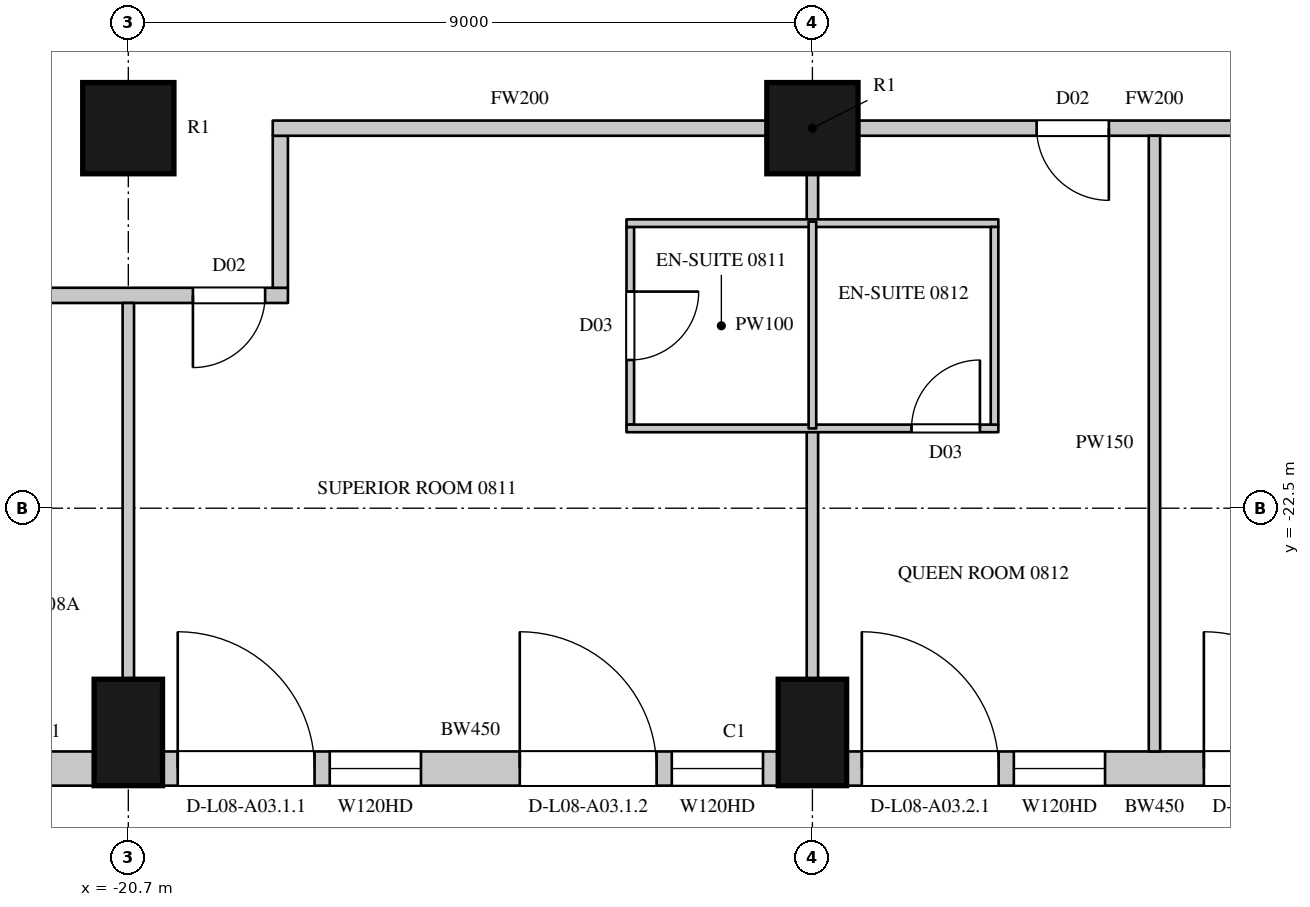
"""IFC4 building model, lengths in metres.
Left out: names, types, materials, properties, quantities, classifications, styles, units other than length and angle.
Written with IfcOpenShell. Run it as: python <this file> out.ifc"""

import sys

from ifc_helpers import new_model, si_unit, direction, frame, frame_2d, origin, origin_2d, place, context, subcontext, project, spatial, rectangle, circle, extrude, element, fill, save


model = new_model("IFC4")
c1 = context("Model", 3, precision=1e-05, world=origin(), true_north=direction((0.0, 1.0)))
c2 = subcontext(c1, "Body", "Model", "MODEL_VIEW")
j1 = project(units=[si_unit("LENGTHUNIT", "METRE"), si_unit("PLANEANGLEUNIT", "RADIAN")], contexts=[c1])
p1 = place(None, origin())
s1 = spatial("IfcSite", under=j1, at=p1, CompositionType="ELEMENT")
p2 = place(p1, origin())
s2 = spatial("IfcBuilding", under=s1, at=p2, CompositionType="ELEMENT")
p3 = place(p2, frame((0.0, 0.0, 59.1)))
s3 = spatial("IfcBuildingStorey", under=s2, at=p3, CompositionType="ELEMENT", Elevation=59.1)
for number, where, z_axis, x_axis in (
    (1, (-20.7, -25.45, 0.0), (0.0, 0.0, 1.0), (1.0, 0.0, 0.0)),
    (2, (-11.7, -25.45, 0.0), (0.0, 0.0, 1.0), (1.0, 0.0, 0.0)),
):
    element("IfcColumn", number, at=place(p3, frame(where, z_axis=z_axis, x_axis=x_axis)), inside=s3, PredefinedType="COLUMN", context=c2, shape_type="SweptSolid", body=[
        extrude(rectangle(XDim=0.9, YDim=1.4, at=origin_2d()), origin(), (0.0, 0.0, 1.0), 3.6),
    ])
for number, where, z_axis, x_axis in (
    (3, (-20.7, -17.5, 0.0), (0.0, 0.0, 1.0), (1.0, 0.0, 0.0)),
    (4, (-11.7, -17.5, 0.0), (0.0, 0.0, 1.0), (1.0, 0.0, 0.0)),
):
    element("IfcColumn", number, at=place(p3, frame(where, z_axis=z_axis, x_axis=x_axis)), inside=s3, PredefinedType="COLUMN", context=c2, shape_type="SweptSolid", body=[
        extrude(circle(Radius=0.6, at=origin_2d()), origin(), (0.0, 0.0, 1.0), 3.6),
    ])
p4 = place(p3, frame((-24.064, -25.925, 0.0), z_axis=(0.0, 0.0, 1.0), x_axis=(1.0, 0.0, 0.0)))
e5 = element("IfcWall", 5, at=p4, inside=s3, PredefinedType="SOLIDWALL", context=c2, shape_type="SweptSolid", body=[
    extrude(rectangle(XDim=2.914, YDim=0.45, at=frame_2d((1.457, 0.0))), origin(), (0.0, 0.0, 1.0), 3.3),
])
p5 = place(p3, frame((-20.25, -25.925, 0.0), z_axis=(0.0, 0.0, 1.0), x_axis=(1.0, 0.0, 0.0)))
e6 = element("IfcWall", 6, at=p5, inside=s3, PredefinedType="SOLIDWALL", context=c2, shape_type="SweptSolid", body=[
    extrude(rectangle(XDim=8.1, YDim=0.45, at=frame_2d((4.05, 0.0))), origin(), (0.0, 0.0, 1.0), 3.3),
])
p6 = place(p5, frame((0.2, 0.0, 0.0)))
e7 = element("IfcOpeningElement", 7, at=p6, cuts=e6, PredefinedType="OPENING", context=c2, shape_type="SweptSolid", body=[
    extrude(rectangle(XDim=1.8, YDim=2.4, at=frame_2d((0.9, 1.2))), frame((0.0, 0.235, 0.0), z_axis=(0.0, -1.0, 0.0), x_axis=(1.0, 0.0, 0.0)), (0.0, 0.0, 1.0), 0.47),
])
p7 = place(p5, frame((2.2, 0.0, 1.05)))
e8 = element("IfcOpeningElement", 8, at=p7, cuts=e6, PredefinedType="OPENING", context=c2, shape_type="SweptSolid", body=[
    extrude(rectangle(XDim=1.2, YDim=2.0, at=frame_2d((0.6, 1.0))), frame((0.0, 0.235, 0.0), z_axis=(0.0, -1.0, 0.0), x_axis=(1.0, 0.0, 0.0)), (0.0, 0.0, 1.0), 0.47),
])
p8 = place(p5, frame((4.7, 0.0, 0.0)))
e9 = element("IfcOpeningElement", 9, at=p8, cuts=e6, PredefinedType="OPENING", context=c2, shape_type="SweptSolid", body=[
    extrude(rectangle(XDim=1.8, YDim=2.4, at=frame_2d((0.9, 1.2))), frame((0.0, 0.235, 0.0), z_axis=(0.0, -1.0, 0.0), x_axis=(1.0, 0.0, 0.0)), (0.0, 0.0, 1.0), 0.47),
])
p9 = place(p5, frame((6.7, 0.0, 1.05)))
e10 = element("IfcOpeningElement", 10, at=p9, cuts=e6, PredefinedType="OPENING", context=c2, shape_type="SweptSolid", body=[
    extrude(rectangle(XDim=1.2, YDim=2.0, at=frame_2d((0.6, 1.0))), frame((0.0, 0.235, 0.0), z_axis=(0.0, -1.0, 0.0), x_axis=(1.0, 0.0, 0.0)), (0.0, 0.0, 1.0), 0.47),
])
p10 = place(p3, frame((-11.25, -25.925, 0.0), z_axis=(0.0, 0.0, 1.0), x_axis=(1.0, 0.0, 0.0)))
e11 = element("IfcWall", 11, at=p10, inside=s3, PredefinedType="SOLIDWALL", context=c2, shape_type="SweptSolid", body=[
    extrude(rectangle(XDim=8.1, YDim=0.45, at=frame_2d((4.05, 0.0))), origin(), (0.0, 0.0, 1.0), 3.3),
])
p11 = place(p10, frame((0.2, 0.0, 0.0)))
e12 = element("IfcOpeningElement", 12, at=p11, cuts=e11, PredefinedType="OPENING", context=c2, shape_type="SweptSolid", body=[
    extrude(rectangle(XDim=1.8, YDim=2.4, at=frame_2d((0.9, 1.2))), frame((0.0, 0.235, 0.0), z_axis=(0.0, -1.0, 0.0), x_axis=(1.0, 0.0, 0.0)), (0.0, 0.0, 1.0), 0.47),
])
p12 = place(p10, frame((2.2, 0.0, 1.05)))
e13 = element("IfcOpeningElement", 13, at=p12, cuts=e11, PredefinedType="OPENING", context=c2, shape_type="SweptSolid", body=[
    extrude(rectangle(XDim=1.2, YDim=2.0, at=frame_2d((0.6, 1.0))), frame((0.0, 0.235, 0.0), z_axis=(0.0, -1.0, 0.0), x_axis=(1.0, 0.0, 0.0)), (0.0, 0.0, 1.0), 0.47),
])
p13 = place(p10, frame((4.7, 0.0, 0.0)))
e14 = element("IfcOpeningElement", 14, at=p13, cuts=e11, PredefinedType="OPENING", context=c2, shape_type="SweptSolid", body=[
    extrude(rectangle(XDim=1.8, YDim=2.4, at=frame_2d((0.9, 1.2))), frame((0.0, 0.235, 0.0), z_axis=(0.0, -1.0, 0.0), x_axis=(1.0, 0.0, 0.0)), (0.0, 0.0, 1.0), 0.47),
])
p14 = place(p10, frame((6.7, 0.0, 1.05)))
e15 = element("IfcOpeningElement", 15, at=p14, cuts=e11, PredefinedType="OPENING", context=c2, shape_type="SweptSolid", body=[
    extrude(rectangle(XDim=1.2, YDim=2.0, at=frame_2d((0.6, 1.0))), frame((0.0, 0.235, 0.0), z_axis=(0.0, -1.0, 0.0), x_axis=(1.0, 0.0, 0.0)), (0.0, 0.0, 1.0), 0.47),
])
p15 = place(p3, frame((-23.7, -19.7, 0.0), z_axis=(0.0, 0.0, 1.0), x_axis=(1.0, 0.0, 0.0)))
e16 = element("IfcWall", 16, at=p15, inside=s3, PredefinedType="PARTITIONING", context=c2, shape_type="SweptSolid", body=[
    extrude(rectangle(XDim=5.1, YDim=0.2, at=frame_2d((2.55, 0.0))), origin(), (0.0, 0.0, 1.0), 3.3),
])
p16 = place(p15, frame((0.8, 0.0, 0.0)))
e17 = element("IfcOpeningElement", 17, at=p16, cuts=e16, PredefinedType="OPENING", context=c2, shape_type="SweptSolid", body=[
    extrude(rectangle(XDim=0.9, YDim=2.2, at=frame_2d((0.45, 1.1))), frame((0.0, 0.11, 0.0), z_axis=(0.0, -1.0, 0.0), x_axis=(1.0, 0.0, 0.0)), (0.0, 0.0, 1.0), 0.22),
])
p17 = place(p15, frame((3.85, 0.0, 0.0)))
e18 = element("IfcOpeningElement", 18, at=p17, cuts=e16, PredefinedType="OPENING", context=c2, shape_type="SweptSolid", body=[
    extrude(rectangle(XDim=0.95, YDim=2.2, at=frame_2d((0.475, 1.1))), frame((0.0, 0.11, 0.0), z_axis=(0.0, -1.0, 0.0), x_axis=(1.0, 0.0, 0.0)), (0.0, 0.0, 1.0), 0.22),
])
p18 = place(p3, frame((-18.7, -19.6, 0.0), z_axis=(0.0, 0.0, 1.0), x_axis=(0.0, 1.0, 0.0)))
e19 = element("IfcWall", 19, at=p18, inside=s3, PredefinedType="PARTITIONING", context=c2, shape_type="SweptSolid", body=[
    extrude(rectangle(XDim=2.0, YDim=0.2, at=frame_2d((1.0, 0.0))), origin(), (0.0, 0.0, 1.0), 3.3),
])
p19 = place(p3, frame((-18.8, -17.5, 0.0), z_axis=(0.0, 0.0, 1.0), x_axis=(1.0, 0.0, 0.0)))
e20 = element("IfcWall", 20, at=p19, inside=s3, PredefinedType="PARTITIONING", context=c2, shape_type="SweptSolid", body=[
    extrude(rectangle(XDim=6.5, YDim=0.2, at=frame_2d((3.25, 0.0))), origin(), (0.0, 0.0, 1.0), 2.75),
])
p20 = place(p3, frame((-11.1, -17.5, 0.0), z_axis=(0.0, 0.0, 1.0), x_axis=(1.0, 0.0, 0.0)))
e21 = element("IfcWall", 21, at=p20, inside=s3, PredefinedType="PARTITIONING", context=c2, shape_type="SweptSolid", body=[
    extrude(rectangle(XDim=7.8, YDim=0.2, at=frame_2d((3.9, 0.0))), origin(), (0.0, 0.0, 1.0), 2.75),
])
p21 = place(p20, frame((2.35, 0.0, 0.0)))
e22 = element("IfcOpeningElement", 22, at=p21, cuts=e21, PredefinedType="OPENING", context=c2, shape_type="SweptSolid", body=[
    extrude(rectangle(XDim=0.95, YDim=2.2, at=frame_2d((0.475, 1.1))), frame((0.0, 0.11, 0.0), z_axis=(0.0, -1.0, 0.0), x_axis=(1.0, 0.0, 0.0)), (0.0, 0.0, 1.0), 0.22),
])
p22 = place(p20, frame((5.2, 0.0, 0.0)))
e23 = element("IfcOpeningElement", 23, at=p22, cuts=e21, PredefinedType="OPENING", context=c2, shape_type="SweptSolid", body=[
    extrude(rectangle(XDim=0.95, YDim=2.2, at=frame_2d((0.475, 1.1))), frame((0.0, 0.11, 0.0), z_axis=(0.0, -1.0, 0.0), x_axis=(1.0, 0.0, 0.0)), (0.0, 0.0, 1.0), 0.22),
])
p23 = place(p3, frame((-20.7, -24.75, 0.0), z_axis=(0.0, 0.0, 1.0), x_axis=(0.0, 1.0, 0.0)))
e24 = element("IfcWall", 24, at=p23, inside=s3, PredefinedType="PARTITIONING", context=c2, shape_type="SweptSolid", body=[
    extrude(rectangle(XDim=4.95, YDim=0.15, at=frame_2d((2.475, 0.0))), origin(), (0.0, 0.0, 1.0), 2.75),
])
p24 = place(p3, frame((-11.7, -24.75, 0.0), z_axis=(0.0, 0.0, 1.0), x_axis=(0.0, 1.0, 0.0)))
e25 = element("IfcWall", 25, at=p24, inside=s3, PredefinedType="PARTITIONING", context=c2, shape_type="SweptSolid", body=[
    extrude(rectangle(XDim=3.3, YDim=0.15, at=frame_2d((1.65, 0.0))), origin(), (0.0, 0.0, 1.0), 2.75),
])
p25 = place(p3, frame((-11.7, -18.73, 0.0), z_axis=(0.0, 0.0, 1.0), x_axis=(0.0, 1.0, 0.0)))
e26 = element("IfcWall", 26, at=p25, inside=s3, PredefinedType="PARTITIONING", context=c2, shape_type="SweptSolid", body=[
    extrude(rectangle(XDim=0.63, YDim=0.15, at=frame_2d((0.315, 0.0))), origin(), (0.0, 0.0, 1.0), 2.75),
])
p26 = place(p3, frame((-7.2, -25.7, 0.0), z_axis=(0.0, 0.0, 1.0), x_axis=(0.0, 1.0, 0.0)))
e27 = element("IfcWall", 27, at=p26, inside=s3, PredefinedType="PARTITIONING", context=c2, shape_type="SweptSolid", body=[
    extrude(rectangle(XDim=8.1, YDim=0.15, at=frame_2d((4.05, 0.0))), origin(), (0.0, 0.0, 1.0), 2.65),
])
p27 = place(p3, frame((-14.096, -21.4, 0.0), z_axis=(0.0, 0.0, 1.0), x_axis=(0.0, 1.0, 0.0)))
e28 = element("IfcWall", 28, at=p27, inside=s3, PredefinedType="PARTITIONING", context=c2, shape_type="SweptSolid", body=[
    extrude(rectangle(XDim=2.6, YDim=0.1, at=frame_2d((1.3, 0.0))), origin(), (0.0, 0.0, 1.0), 3.3),
])
p28 = place(p27, frame((0.85, 0.0, 0.0)))
e29 = element("IfcOpeningElement", 29, at=p28, cuts=e28, PredefinedType="OPENING", context=c2, shape_type="SweptSolid", body=[
    extrude(rectangle(XDim=0.9, YDim=2.2, at=frame_2d((0.45, 1.1))), frame((0.0, 0.06, 0.0), z_axis=(0.0, -1.0, 0.0), x_axis=(1.0, 0.0, 0.0)), (0.0, 0.0, 1.0), 0.12),
])
p29 = place(p3, frame((-14.146, -21.45, 0.0), z_axis=(0.0, 0.0, 1.0), x_axis=(1.0, 0.0, 0.0)))
e30 = element("IfcWall", 30, at=p29, inside=s3, PredefinedType="PARTITIONING", context=c2, shape_type="SweptSolid", body=[
    extrude(rectangle(XDim=4.892, YDim=0.1, at=frame_2d((2.446, 0.0))), origin(), (0.0, 0.0, 1.0), 3.3),
])
p30 = place(p29, frame((3.75, 0.0, 0.0)))
e31 = element("IfcOpeningElement", 31, at=p30, cuts=e30, PredefinedType="OPENING", context=c2, shape_type="SweptSolid", body=[
    extrude(rectangle(XDim=0.9, YDim=2.2, at=frame_2d((0.45, 1.1))), frame((0.0, 0.06, 0.0), z_axis=(0.0, -1.0, 0.0), x_axis=(1.0, 0.0, 0.0)), (0.0, 0.0, 1.0), 0.12),
])
p31 = place(p3, frame((-14.146, -18.75, 0.0), z_axis=(0.0, 0.0, 1.0), x_axis=(1.0, 0.0, 0.0)))
e32 = element("IfcWall", 32, at=p31, inside=s3, PredefinedType="PARTITIONING", context=c2, shape_type="SweptSolid", body=[
    extrude(rectangle(XDim=4.892, YDim=0.1, at=frame_2d((2.446, 0.0))), origin(), (0.0, 0.0, 1.0), 3.3),
])
p32 = place(p3, frame((-11.7, -21.45, 0.0), z_axis=(0.0, 0.0, 1.0), x_axis=(0.0, 1.0, 0.0)))
e33 = element("IfcWall", 33, at=p32, inside=s3, PredefinedType="PARTITIONING", context=c2, shape_type="SweptSolid", body=[
    extrude(rectangle(XDim=2.72, YDim=0.1, at=frame_2d((1.36, 0.0))), origin(), (0.0, 0.0, 1.0), 2.75),
])
p33 = place(p3, frame((-9.304, -21.4, 0.0), z_axis=(0.0, 0.0, 1.0), x_axis=(0.0, 1.0, 0.0)))
e34 = element("IfcWall", 34, at=p33, inside=s3, PredefinedType="PARTITIONING", context=c2, shape_type="SweptSolid", body=[
    extrude(rectangle(XDim=2.6, YDim=0.1, at=frame_2d((1.3, 0.0))), origin(), (0.0, 0.0, 1.0), 3.3),
])
p34 = place(p6, origin())
e35 = element("IfcDoor", 35, at=p34, inside=s3, OperationType="SLIDING_TO_LEFT", PredefinedType="DOOR", context=c2, shape_type="SweptSolid", body=[
    extrude(rectangle(XDim=1.8, YDim=2.4, at=frame_2d((0.9, 1.2))), frame((0.0, 0.13, 0.0), z_axis=(0.0, -1.0, 0.0), x_axis=(1.0, 0.0, 0.0)), (0.0, 0.0, 1.0), 0.05),
])
fill(e7, e35)
p35 = place(p7, origin())
e36 = element("IfcWindow", 36, at=p35, inside=s3, PartitioningType="SINGLE_PANEL", PredefinedType="WINDOW", context=c2, shape_type="SweptSolid", body=[
    extrude(rectangle(XDim=1.2, YDim=2.0, at=frame_2d((0.6, 1.0))), frame((0.0, 0.135, 0.0), z_axis=(0.0, -1.0, 0.0), x_axis=(1.0, 0.0, 0.0)), (0.0, 0.0, 1.0), 0.06),
])
fill(e8, e36)
p36 = place(p8, origin())
e37 = element("IfcDoor", 37, at=p36, inside=s3, OperationType="SLIDING_TO_LEFT", PredefinedType="DOOR", context=c2, shape_type="SweptSolid", body=[
    extrude(rectangle(XDim=1.8, YDim=2.4, at=frame_2d((0.9, 1.2))), frame((0.0, 0.13, 0.0), z_axis=(0.0, -1.0, 0.0), x_axis=(1.0, 0.0, 0.0)), (0.0, 0.0, 1.0), 0.05),
])
fill(e9, e37)
p37 = place(p9, origin())
e38 = element("IfcWindow", 38, at=p37, inside=s3, PartitioningType="SINGLE_PANEL", PredefinedType="WINDOW", context=c2, shape_type="SweptSolid", body=[
    extrude(rectangle(XDim=1.2, YDim=2.0, at=frame_2d((0.6, 1.0))), frame((0.0, 0.135, 0.0), z_axis=(0.0, -1.0, 0.0), x_axis=(1.0, 0.0, 0.0)), (0.0, 0.0, 1.0), 0.06),
])
fill(e10, e38)
p38 = place(p11, origin())
e39 = element("IfcDoor", 39, at=p38, inside=s3, OperationType="SLIDING_TO_LEFT", PredefinedType="DOOR", context=c2, shape_type="SweptSolid", body=[
    extrude(rectangle(XDim=1.8, YDim=2.4, at=frame_2d((0.9, 1.2))), frame((0.0, 0.13, 0.0), z_axis=(0.0, -1.0, 0.0), x_axis=(1.0, 0.0, 0.0)), (0.0, 0.0, 1.0), 0.05),
])
fill(e12, e39)
p39 = place(p12, origin())
e40 = element("IfcWindow", 40, at=p39, inside=s3, PartitioningType="SINGLE_PANEL", PredefinedType="WINDOW", context=c2, shape_type="SweptSolid", body=[
    extrude(rectangle(XDim=1.2, YDim=2.0, at=frame_2d((0.6, 1.0))), frame((0.0, 0.135, 0.0), z_axis=(0.0, -1.0, 0.0), x_axis=(1.0, 0.0, 0.0)), (0.0, 0.0, 1.0), 0.06),
])
fill(e13, e40)
p40 = place(p13, origin())
e41 = element("IfcDoor", 41, at=p40, inside=s3, OperationType="SLIDING_TO_LEFT", PredefinedType="DOOR", context=c2, shape_type="SweptSolid", body=[
    extrude(rectangle(XDim=1.8, YDim=2.4, at=frame_2d((0.9, 1.2))), frame((0.0, 0.13, 0.0), z_axis=(0.0, -1.0, 0.0), x_axis=(1.0, 0.0, 0.0)), (0.0, 0.0, 1.0), 0.05),
])
fill(e14, e41)
p41 = place(p17, origin())
e42 = element("IfcDoor", 42, at=p41, inside=s3, OperationType="SINGLE_SWING_RIGHT", PredefinedType="DOOR", context=c2, shape_type="SweptSolid", body=[
    extrude(rectangle(XDim=0.95, YDim=2.2, at=frame_2d((0.475, 1.1))), frame((0.0, 0.025, 0.0), z_axis=(0.0, -1.0, 0.0), x_axis=(1.0, 0.0, 0.0)), (0.0, 0.0, 1.0), 0.05),
])
fill(e18, e42)
p42 = place(p28, origin())
e43 = element("IfcDoor", 43, at=p42, inside=s3, OperationType="SINGLE_SWING_LEFT", PredefinedType="DOOR", context=c2, shape_type="SweptSolid", body=[
    extrude(rectangle(XDim=0.9, YDim=2.2, at=frame_2d((0.45, 1.1))), frame((0.0, 0.025, 0.0), z_axis=(0.0, -1.0, 0.0), x_axis=(1.0, 0.0, 0.0)), (0.0, 0.0, 1.0), 0.05),
])
fill(e29, e43)
p43 = place(p21, origin())
e44 = element("IfcDoor", 44, at=p43, inside=s3, OperationType="SINGLE_SWING_LEFT", PredefinedType="DOOR", context=c2, shape_type="SweptSolid", body=[
    extrude(rectangle(XDim=0.95, YDim=2.2, at=frame_2d((0.475, 1.1))), frame((0.0, 0.025, 0.0), z_axis=(0.0, -1.0, 0.0), x_axis=(1.0, 0.0, 0.0)), (0.0, 0.0, 1.0), 0.05),
])
fill(e22, e44)
p44 = place(p30, origin())
e45 = element("IfcDoor", 45, at=p44, inside=s3, OperationType="SINGLE_SWING_RIGHT", PredefinedType="DOOR", context=c2, shape_type="SweptSolid", body=[
    extrude(rectangle(XDim=0.9, YDim=2.2, at=frame_2d((0.45, 1.1))), frame((0.0, 0.025, 0.0), z_axis=(0.0, -1.0, 0.0), x_axis=(1.0, 0.0, 0.0)), (0.0, 0.0, 1.0), 0.05),
])
fill(e31, e45)
save(model, sys.argv[1])
